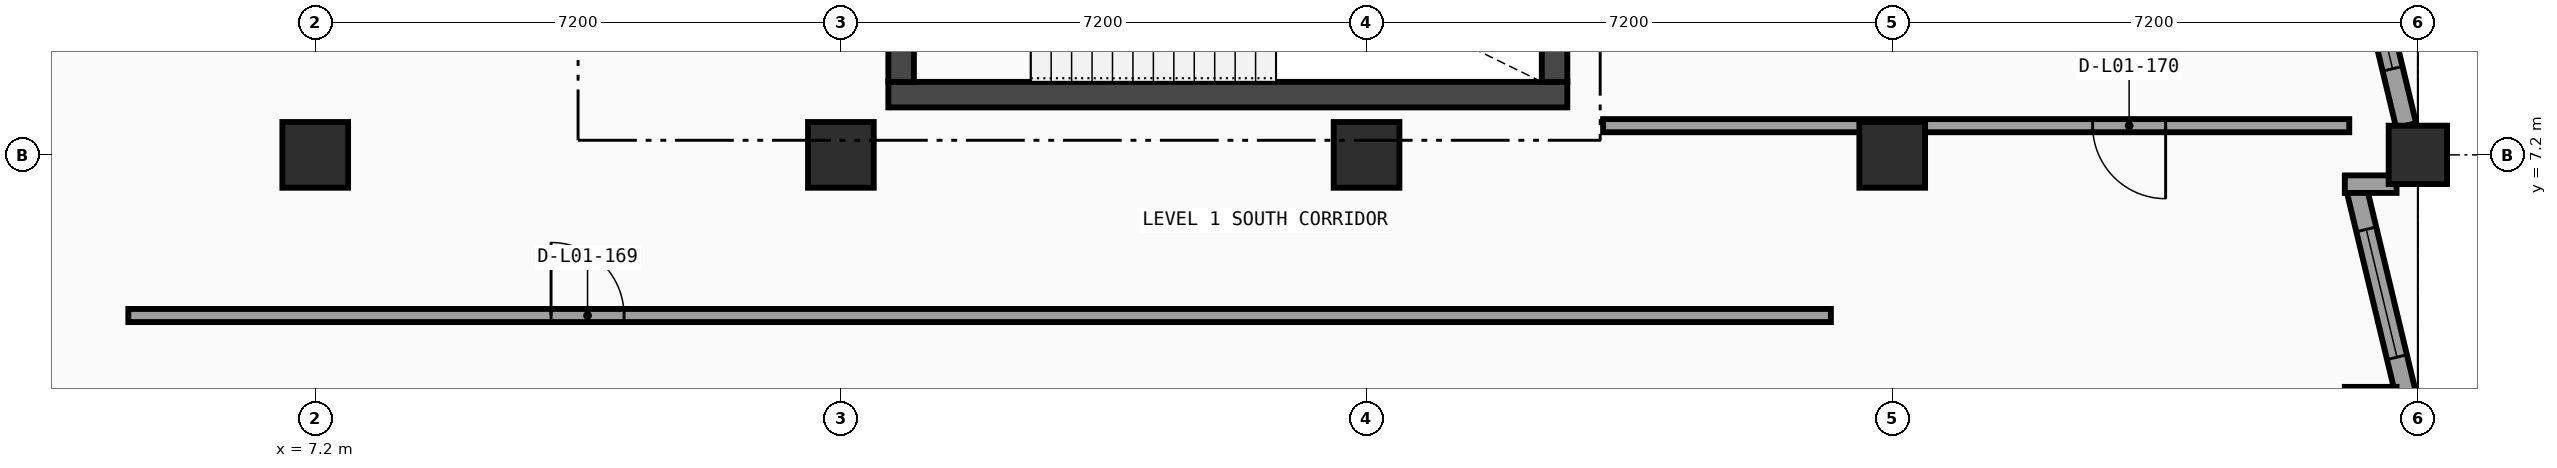
"""IFC4 building model, lengths in metres.
Left out: names, types, materials, properties, quantities, classifications, styles, units other than length and angle.
Written with IfcOpenShell. Run it as: python <this file> out.ifc"""

import sys

from ifc_helpers import new_model, si_unit, direction, frame, frame_2d, origin, origin_2d, place, context, subcontext, project, spatial, rectangle, extrude, element, fill, save


model = new_model("IFC4")
c1 = context("Model", 3, precision=1e-05, world=origin(), true_north=direction((0.0, 1.0)))
c2 = subcontext(c1, "Body", "Model", "MODEL_VIEW")
j1 = project(units=[si_unit("LENGTHUNIT", "METRE"), si_unit("PLANEANGLEUNIT", "RADIAN")], contexts=[c1])
p1 = place(None, origin())
s1 = spatial("IfcSite", under=j1, at=p1, CompositionType="ELEMENT")
p2 = place(p1, origin())
s2 = spatial("IfcBuilding", under=s1, at=p2, CompositionType="ELEMENT")
p3 = place(p2, frame((0.0, 0.0, 5.4)))
s3 = spatial("IfcBuildingStorey", under=s2, at=p3, CompositionType="ELEMENT", Elevation=5.4)
for number, where, z_axis, x_axis in (
    (1, (7.2, 7.2, 0.0), (0.0, 0.0, 1.0), (1.0, 0.0, 0.0)),
    (2, (14.4, 7.2, 0.0), (0.0, 0.0, 1.0), (1.0, 0.0, 0.0)),
    (3, (21.6, 7.2, 0.0), (0.0, 0.0, 1.0), (1.0, 0.0, 0.0)),
    (4, (28.8, 7.2, 0.0), (0.0, 0.0, 1.0), (1.0, 0.0, 0.0)),
):
    element("IfcColumn", number, at=place(p3, frame(where, z_axis=z_axis, x_axis=x_axis)), inside=s3, PredefinedType="COLUMN", context=c2, shape_type="SweptSolid", body=[
        extrude(rectangle(XDim=0.9, YDim=0.9, at=origin_2d()), origin(), (0.0, 0.0, 1.0), 4.8),
    ])
p4 = place(p3, frame((36.0, 7.2, 0.0), z_axis=(0.0, 0.0, 1.0), x_axis=(1.0, 0.0, 0.0)))
e5 = element("IfcColumn", 5, at=p4, inside=s3, PredefinedType="COLUMN", context=c2, shape_type="SweptSolid", body=[
    extrude(rectangle(XDim=0.8, YDim=0.8, at=origin_2d()), origin(), (0.0, 0.0, 1.0), 4.8),
])
p5 = place(p3, frame((35.046, 10.908, 0.0), z_axis=(0.0, 0.0, 1.0), x_axis=(0.233438110442, -0.97237166176, 0.0)))
e6 = element("IfcWall", 6, at=p5, inside=s3, PredefinedType="SOLIDWALL", context=c2, shape_type="SweptSolid", body=[
    extrude(rectangle(XDim=3.401, YDim=0.28, at=frame_2d((1.701, 0.0))), origin(), (0.0, 0.0, 1.0), 3.201),
])
p6 = place(p5, frame((0.801, 0.0, 0.8)))
e7 = element("IfcOpeningElement", 7, at=p6, cuts=e6, PredefinedType="OPENING", context=c2, shape_type="SweptSolid", body=[
    extrude(rectangle(XDim=1.8, YDim=1.85, at=frame_2d((0.9, 0.925))), frame((0.0, 0.15, 0.0), z_axis=(0.0, -1.0, 0.0), x_axis=(1.0, 0.0, 0.0)), (0.0, 0.0, 1.0), 0.3),
])
p7 = place(p3, frame((35.167, 6.707, 0.0), z_axis=(0.0, 0.0, 1.0), x_axis=(0.233501033921, -0.972356553512, 0.0)))
e8 = element("IfcWall", 8, at=p7, inside=s3, PredefinedType="SOLIDWALL", context=c2, shape_type="SweptSolid", body=[
    extrude(rectangle(XDim=2.884, YDim=0.28, at=frame_2d((1.442, 0.0))), origin(), (0.0, 0.0, 1.0), 3.976),
])
p8 = place(p7, frame((0.542, 0.0, 0.8)))
e9 = element("IfcOpeningElement", 9, at=p8, cuts=e8, PredefinedType="OPENING", context=c2, shape_type="SweptSolid", body=[
    extrude(rectangle(XDim=1.8, YDim=1.85, at=frame_2d((0.9, 0.925))), frame((0.0, 0.15, 0.0), z_axis=(0.0, -1.0, 0.0), x_axis=(1.0, 0.0, 0.0)), (0.0, 0.0, 1.0), 0.3),
])
for number, where, z_axis, x_axis in (
    (10, (35.0, 6.799, 0.0), (0.0, 0.0, 1.0), (1.0, 0.0, 0.0)),
    (11, (35.0, 3.903, 0.0), (0.0, 0.0, 1.0), (1.0, 0.0, 0.0)),
):
    element("IfcWall", number, at=place(p3, frame(where, z_axis=z_axis, x_axis=x_axis)), inside=s3, PredefinedType="SOLIDWALL", context=c2, shape_type="SweptSolid", body=[
        extrude(rectangle(XDim=0.708, YDim=0.24, at=frame_2d((0.354, 0.0))), origin(), (0.0, 0.0, 1.0), 4.52),
    ])
p9 = place(p3, frame((15.05, 8.025, 0.0), z_axis=(0.0, 0.0, 1.0), x_axis=(1.0, 0.0, 0.0)))
e12 = element("IfcWall", 12, at=p9, inside=s3, PredefinedType="SHEAR", context=c2, shape_type="SweptSolid", body=[
    extrude(rectangle(XDim=9.3, YDim=0.35, at=frame_2d((4.65, 0.0))), origin(), (0.0, 0.0, 1.0), 4.52),
])
p10 = place(p3, frame((15.225, 11.6, 0.0), z_axis=(0.0, 0.0, 1.0), x_axis=(0.0, -1.0, 0.0)))
e13 = element("IfcWall", 13, at=p10, inside=s3, PredefinedType="SHEAR", context=c2, shape_type="SweptSolid", body=[
    extrude(rectangle(XDim=3.4, YDim=0.35, at=frame_2d((1.7, 0.0))), origin(), (0.0, 0.0, 1.0), 4.52),
])
p11 = place(p10, frame((1.125, 0.0, 0.0)))
e14 = element("IfcOpeningElement", 14, at=p11, cuts=e13, PredefinedType="OPENING", context=c2, shape_type="SweptSolid", body=[
    extrude(rectangle(XDim=1.15, YDim=2.1, at=frame_2d((0.575, 1.05))), frame((0.0, 0.185, 0.0), z_axis=(0.0, -1.0, 0.0), x_axis=(1.0, 0.0, 0.0)), (0.0, 0.0, 1.0), 0.37),
])
p12 = place(p3, frame((24.175, 8.2, 0.0), z_axis=(0.0, 0.0, 1.0), x_axis=(0.0, 1.0, 0.0)))
e15 = element("IfcWall", 15, at=p12, inside=s3, PredefinedType="SHEAR", context=c2, shape_type="SweptSolid", body=[
    extrude(rectangle(XDim=3.4, YDim=0.35, at=frame_2d((1.7, 0.0))), origin(), (0.0, 0.0, 1.0), 4.52),
])
p13 = place(p3, frame((4.64, 5.0, 0.0), z_axis=(0.0, 0.0, 1.0), x_axis=(1.0, 0.0, 0.0)))
e16 = element("IfcWall", 16, at=p13, inside=s3, PredefinedType="PARTITIONING", context=c2, shape_type="SweptSolid", body=[
    extrude(rectangle(XDim=23.32, YDim=0.18, at=frame_2d((11.66, 0.0))), origin(), (0.0, 0.0, 1.0), 3.801),
])
p14 = place(p13, frame((5.79, 0.0, 0.0)))
e17 = element("IfcOpeningElement", 17, at=p14, cuts=e16, PredefinedType="OPENING", context=c2, shape_type="SweptSolid", body=[
    extrude(rectangle(XDim=1.0, YDim=2.1, at=frame_2d((0.5, 1.05))), frame((0.0, 0.1, 0.0), z_axis=(0.0, -1.0, 0.0), x_axis=(1.0, 0.0, 0.0)), (0.0, 0.0, 1.0), 0.2),
])
p15 = place(p3, frame((24.84, 7.6, 0.0), z_axis=(0.0, 0.0, 1.0), x_axis=(1.0, 0.0, 0.0)))
e18 = element("IfcWall", 18, at=p15, inside=s3, PredefinedType="PARTITIONING", context=c2, shape_type="SweptSolid", body=[
    extrude(rectangle(XDim=10.22, YDim=0.18, at=frame_2d((5.11, 0.0))), origin(), (0.0, 0.0, 1.0), 3.801),
])
p16 = place(p15, frame((6.705, 0.0, 0.0)))
e19 = element("IfcOpeningElement", 19, at=p16, cuts=e18, PredefinedType="OPENING", context=c2, shape_type="SweptSolid", body=[
    extrude(rectangle(XDim=1.0, YDim=2.1, at=frame_2d((0.5, 1.05))), frame((0.0, 0.1, 0.0), z_axis=(0.0, -1.0, 0.0), x_axis=(1.0, 0.0, 0.0)), (0.0, 0.0, 1.0), 0.2),
])
p17 = place(p6, origin())
e20 = element("IfcWindow", 20, at=p17, inside=s3, PartitioningType="SINGLE_PANEL", PredefinedType="WINDOW", context=c2, shape_type="SweptSolid", body=[
    extrude(rectangle(XDim=1.8, YDim=1.85, at=frame_2d((0.9, 0.925))), frame((0.0, 0.03, 0.0), z_axis=(0.0, -1.0, 0.0), x_axis=(1.0, 0.0, 0.0)), (0.0, 0.0, 1.0), 0.06),
])
fill(e7, e20)
p18 = place(p8, origin())
e21 = element("IfcWindow", 21, at=p18, inside=s3, PartitioningType="SINGLE_PANEL", PredefinedType="WINDOW", context=c2, shape_type="SweptSolid", body=[
    extrude(rectangle(XDim=1.8, YDim=1.85, at=frame_2d((0.9, 0.925))), frame((0.0, 0.03, 0.0), z_axis=(0.0, -1.0, 0.0), x_axis=(1.0, 0.0, 0.0)), (0.0, 0.0, 1.0), 0.06),
])
fill(e9, e21)
p19 = place(p14, origin())
e22 = element("IfcDoor", 22, at=p19, inside=s3, OperationType="SINGLE_SWING_LEFT", PredefinedType="DOOR", context=c2, shape_type="SweptSolid", body=[
    extrude(rectangle(XDim=1.0, YDim=2.1, at=frame_2d((0.5, 1.05))), frame((0.0, 0.025, 0.0), z_axis=(0.0, -1.0, 0.0), x_axis=(1.0, 0.0, 0.0)), (0.0, 0.0, 1.0), 0.05),
])
fill(e17, e22)
p20 = place(p16, origin())
e23 = element("IfcDoor", 23, at=p20, inside=s3, OperationType="SINGLE_SWING_RIGHT", PredefinedType="DOOR", context=c2, shape_type="SweptSolid", body=[
    extrude(rectangle(XDim=1.0, YDim=2.1, at=frame_2d((0.5, 1.05))), frame((0.0, 0.025, 0.0), z_axis=(0.0, -1.0, 0.0), x_axis=(1.0, 0.0, 0.0)), (0.0, 0.0, 1.0), 0.05),
])
fill(e19, e23)
save(model, sys.argv[1])
